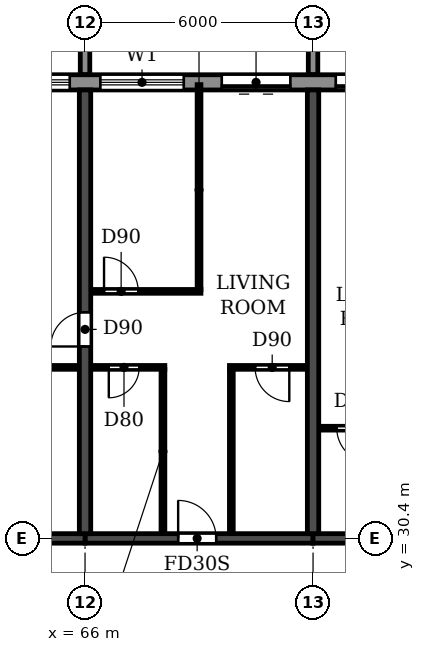
"""IFC4 building model, lengths in metres.
Left out: names, types, materials, properties, quantities, classifications, styles, units other than length and angle.
Written with IfcOpenShell. Run it as: python <this file> out.ifc"""

import sys

from ifc_helpers import new_model, si_unit, direction, frame, frame_2d, origin, place, context, subcontext, project, spatial, polyline, rectangle, outline, extrude, source, transform, mapped, element, fill, save


model = new_model("IFC4")
c1 = context("Model", 3, precision=1e-05, world=origin(), true_north=direction((0.0, 1.0)))
c2 = subcontext(c1, "Body", "Model", "MODEL_VIEW")
j1 = project(units=[si_unit("LENGTHUNIT", "METRE"), si_unit("PLANEANGLEUNIT", "RADIAN")], contexts=[c1])
p1 = place(None, origin())
s1 = spatial("IfcSite", under=j1, at=p1, CompositionType="ELEMENT")
p2 = place(p1, origin())
s2 = spatial("IfcBuilding", under=s1, at=p2, CompositionType="ELEMENT")
p3 = place(p2, frame((0.0, 0.0, 142.2)))
s3 = spatial("IfcBuildingStorey", under=s2, at=p3, CompositionType="ELEMENT", Elevation=142.2)
p4 = place(p3, frame((66.0, 30.525, 0.0), z_axis=(0.0, 0.0, 1.0), x_axis=(0.0, 1.0, 0.0)))
e1 = element("IfcWall", 1, at=p4, inside=s3, PredefinedType="SHEAR", context=c2, shape_type="SweptSolid", body=[
    extrude(rectangle(XDim=11.675, YDim=0.3, at=frame_2d((5.837, 0.0))), origin(), (0.0, 0.0, 1.0), 3.07),
])
p5 = place(p4, frame((4.925, 0.0, 0.0)))
e2 = element("IfcOpeningElement", 2, at=p5, cuts=e1, PredefinedType="OPENING", context=c2, shape_type="SweptSolid", body=[
    extrude(rectangle(XDim=0.9, YDim=2.1, at=frame_2d((0.45, 1.05))), frame((0.0, 0.16, 0.0), z_axis=(0.0, -1.0, 0.0), x_axis=(1.0, 0.0, 0.0)), (0.0, 0.0, 1.0), 0.32),
])
p6 = place(p3, frame((72.0, 30.525, 0.0), z_axis=(0.0, 0.0, 1.0), x_axis=(0.0, 1.0, 0.0)))
e3 = element("IfcWall", 3, at=p6, inside=s3, PredefinedType="SHEAR", context=c2, shape_type="SweptSolid", body=[
    extrude(rectangle(XDim=11.675, YDim=0.3, at=frame_2d((5.837, 0.0))), origin(), (0.0, 0.0, 1.0), 3.07),
])
p7 = place(p3, frame((60.0, 30.4, 0.0), z_axis=(0.0, 0.0, 1.0), x_axis=(1.0, 0.0, 0.0)))
e4 = element("IfcWall", 4, at=p7, inside=s3, PredefinedType="SHEAR", context=c2, shape_type="SweptSolid", body=[
    extrude(rectangle(XDim=6.0, YDim=0.25, at=frame_2d((3.0, 0.0))), origin(), (0.0, 0.0, 1.0), 2.47),
])
p8 = place(p3, frame((66.0, 30.4, 0.0), z_axis=(0.0, 0.0, 1.0), x_axis=(1.0, 0.0, 0.0)))
e5 = element("IfcWall", 5, at=p8, inside=s3, PredefinedType="SHEAR", context=c2, shape_type="SweptSolid", body=[
    extrude(rectangle(XDim=6.0, YDim=0.25, at=frame_2d((3.0, 0.0))), origin(), (0.0, 0.0, 1.0), 2.47),
])
p9 = place(p8, frame((2.45, 0.0, 0.0)))
e6 = element("IfcOpeningElement", 6, at=p9, cuts=e5, PredefinedType="OPENING", context=c2, shape_type="SweptSolid", body=[
    extrude(rectangle(XDim=1.0, YDim=2.1, at=frame_2d((0.5, 1.05))), frame((0.0, 0.135, 0.0), z_axis=(0.0, -1.0, 0.0), x_axis=(1.0, 0.0, 0.0)), (0.0, 0.0, 1.0), 0.27),
])
p10 = place(p3, frame((72.0, 30.4, 0.0), z_axis=(0.0, 0.0, 1.0), x_axis=(1.0, 0.0, 0.0)))
e7 = element("IfcWall", 7, at=p10, inside=s3, PredefinedType="SHEAR", context=c2, shape_type="SweptSolid", body=[
    extrude(rectangle(XDim=6.0, YDim=0.25, at=frame_2d((3.0, 0.0))), origin(), (0.0, 0.0, 1.0), 2.47),
])
p11 = place(p10, frame((2.55, 0.0, 0.0)))
e8 = element("IfcOpeningElement", 8, at=p11, cuts=e7, PredefinedType="OPENING", context=c2, shape_type="SweptSolid", body=[
    extrude(rectangle(XDim=1.0, YDim=2.1, at=frame_2d((0.5, 1.05))), frame((0.0, 0.135, 0.0), z_axis=(0.0, -1.0, 0.0), x_axis=(1.0, 0.0, 0.0)), (0.0, 0.0, 1.0), 0.27),
])
p12 = place(p3, frame((85.317, 42.4, 0.0), z_axis=(0.0, 0.0, 1.0), x_axis=(-1.0, 0.0, 0.0)))
e9 = element("IfcWall", 9, at=p12, inside=s3, PredefinedType="STANDARD", context=c2, shape_type="SweptSolid", body=[
    extrude(rectangle(XDim=68.634, YDim=0.4, at=frame_2d((34.317, 0.0))), origin(), (0.0, 0.0, 1.0), 3.07),
])
p13 = place(p12, frame((64.717, 0.0, 0.9)))
e10 = element("IfcOpeningElement", 10, at=p13, cuts=e9, PredefinedType="OPENING", context=c2, shape_type="SweptSolid", body=[
    extrude(rectangle(XDim=2.2, YDim=1.5, at=frame_2d((1.1, 0.75))), frame((0.0, 0.21, 0.0), z_axis=(0.0, -1.0, 0.0), x_axis=(1.0, 0.0, 0.0)), (0.0, 0.0, 1.0), 0.42),
])
p14 = place(p12, frame((61.917, 0.0, 0.0)))
e11 = element("IfcOpeningElement", 11, at=p14, cuts=e9, PredefinedType="OPENING", context=c2, shape_type="SweptSolid", body=[
    extrude(rectangle(XDim=1.8, YDim=2.4, at=frame_2d((0.9, 1.2))), frame((0.0, 0.21, 0.0), z_axis=(0.0, -1.0, 0.0), x_axis=(1.0, 0.0, 0.0)), (0.0, 0.0, 1.0), 0.42),
])
p15 = place(p12, frame((58.717, 0.0, 0.9)))
e12 = element("IfcOpeningElement", 12, at=p15, cuts=e9, PredefinedType="OPENING", context=c2, shape_type="SweptSolid", body=[
    extrude(rectangle(XDim=2.2, YDim=1.5, at=frame_2d((1.1, 0.75))), frame((0.0, 0.21, 0.0), z_axis=(0.0, -1.0, 0.0), x_axis=(1.0, 0.0, 0.0)), (0.0, 0.0, 1.0), 0.42),
])
p16 = place(p12, frame((55.917, 0.0, 0.0)))
e13 = element("IfcOpeningElement", 13, at=p16, cuts=e9, PredefinedType="OPENING", context=c2, shape_type="SweptSolid", body=[
    extrude(rectangle(XDim=1.8, YDim=2.4, at=frame_2d((0.9, 1.2))), frame((0.0, 0.21, 0.0), z_axis=(0.0, -1.0, 0.0), x_axis=(1.0, 0.0, 0.0)), (0.0, 0.0, 1.0), 0.42),
])
p17 = place(p12, frame((52.717, 0.0, 0.9)))
e14 = element("IfcOpeningElement", 14, at=p17, cuts=e9, PredefinedType="OPENING", context=c2, shape_type="SweptSolid", body=[
    extrude(rectangle(XDim=2.2, YDim=1.5, at=frame_2d((1.1, 0.75))), frame((0.0, 0.21, 0.0), z_axis=(0.0, -1.0, 0.0), x_axis=(1.0, 0.0, 0.0)), (0.0, 0.0, 1.0), 0.42),
])
p18 = place(p12, frame((49.717, 0.0, 0.9)))
e15 = element("IfcOpeningElement", 15, at=p18, cuts=e9, PredefinedType="OPENING", context=c2, shape_type="SweptSolid", body=[
    extrude(rectangle(XDim=2.2, YDim=1.5, at=frame_2d((1.1, 0.75))), frame((0.0, 0.21, 0.0), z_axis=(0.0, -1.0, 0.0), x_axis=(1.0, 0.0, 0.0)), (0.0, 0.0, 1.0), 0.42),
])
p19 = place(p12, frame((46.917, 0.0, 0.0)))
e16 = element("IfcOpeningElement", 16, at=p19, cuts=e9, PredefinedType="OPENING", context=c2, shape_type="SweptSolid", body=[
    extrude(rectangle(XDim=1.8, YDim=2.4, at=frame_2d((0.9, 1.2))), frame((0.0, 0.21, 0.0), z_axis=(0.0, -1.0, 0.0), x_axis=(1.0, 0.0, 0.0)), (0.0, 0.0, 1.0), 0.42),
])
p20 = place(p12, frame((43.717, 0.0, 0.9)))
e17 = element("IfcOpeningElement", 17, at=p20, cuts=e9, PredefinedType="OPENING", context=c2, shape_type="SweptSolid", body=[
    extrude(rectangle(XDim=2.2, YDim=1.5, at=frame_2d((1.1, 0.75))), frame((0.0, 0.21, 0.0), z_axis=(0.0, -1.0, 0.0), x_axis=(1.0, 0.0, 0.0)), (0.0, 0.0, 1.0), 0.42),
])
p21 = place(p12, frame((40.717, 0.0, 0.9)))
e18 = element("IfcOpeningElement", 18, at=p21, cuts=e9, PredefinedType="OPENING", context=c2, shape_type="SweptSolid", body=[
    extrude(rectangle(XDim=2.2, YDim=1.5, at=frame_2d((1.1, 0.75))), frame((0.0, 0.21, 0.0), z_axis=(0.0, -1.0, 0.0), x_axis=(1.0, 0.0, 0.0)), (0.0, 0.0, 1.0), 0.42),
])
p22 = place(p12, frame((37.717, 0.0, 0.9)))
e19 = element("IfcOpeningElement", 19, at=p22, cuts=e9, PredefinedType="OPENING", context=c2, shape_type="SweptSolid", body=[
    extrude(rectangle(XDim=2.2, YDim=1.5, at=frame_2d((1.1, 0.75))), frame((0.0, 0.21, 0.0), z_axis=(0.0, -1.0, 0.0), x_axis=(1.0, 0.0, 0.0)), (0.0, 0.0, 1.0), 0.42),
])
p23 = place(p12, frame((34.717, 0.0, 0.9)))
e20 = element("IfcOpeningElement", 20, at=p23, cuts=e9, PredefinedType="OPENING", context=c2, shape_type="SweptSolid", body=[
    extrude(rectangle(XDim=2.2, YDim=1.5, at=frame_2d((1.1, 0.75))), frame((0.0, 0.21, 0.0), z_axis=(0.0, -1.0, 0.0), x_axis=(1.0, 0.0, 0.0)), (0.0, 0.0, 1.0), 0.42),
])
p24 = place(p12, frame((31.917, 0.0, 0.0)))
e21 = element("IfcOpeningElement", 21, at=p24, cuts=e9, PredefinedType="OPENING", context=c2, shape_type="SweptSolid", body=[
    extrude(rectangle(XDim=1.8, YDim=2.4, at=frame_2d((0.9, 1.2))), frame((0.0, 0.21, 0.0), z_axis=(0.0, -1.0, 0.0), x_axis=(1.0, 0.0, 0.0)), (0.0, 0.0, 1.0), 0.42),
])
p25 = place(p12, frame((28.917, 0.0, 0.0)))
e22 = element("IfcOpeningElement", 22, at=p25, cuts=e9, PredefinedType="OPENING", context=c2, shape_type="SweptSolid", body=[
    extrude(rectangle(XDim=1.8, YDim=2.4, at=frame_2d((0.9, 1.2))), frame((0.0, 0.21, 0.0), z_axis=(0.0, -1.0, 0.0), x_axis=(1.0, 0.0, 0.0)), (0.0, 0.0, 1.0), 0.42),
])
p26 = place(p12, frame((25.717, 0.0, 0.9)))
e23 = element("IfcOpeningElement", 23, at=p26, cuts=e9, PredefinedType="OPENING", context=c2, shape_type="SweptSolid", body=[
    extrude(rectangle(XDim=2.2, YDim=1.5, at=frame_2d((1.1, 0.75))), frame((0.0, 0.21, 0.0), z_axis=(0.0, -1.0, 0.0), x_axis=(1.0, 0.0, 0.0)), (0.0, 0.0, 1.0), 0.42),
])
p27 = place(p12, frame((22.717, 0.0, 0.9)))
e24 = element("IfcOpeningElement", 24, at=p27, cuts=e9, PredefinedType="OPENING", context=c2, shape_type="SweptSolid", body=[
    extrude(rectangle(XDim=2.2, YDim=1.5, at=frame_2d((1.1, 0.75))), frame((0.0, 0.21, 0.0), z_axis=(0.0, -1.0, 0.0), x_axis=(1.0, 0.0, 0.0)), (0.0, 0.0, 1.0), 0.42),
])
p28 = place(p12, frame((19.717, 0.0, 0.9)))
e25 = element("IfcOpeningElement", 25, at=p28, cuts=e9, PredefinedType="OPENING", context=c2, shape_type="SweptSolid", body=[
    extrude(rectangle(XDim=2.2, YDim=1.5, at=frame_2d((1.1, 0.75))), frame((0.0, 0.21, 0.0), z_axis=(0.0, -1.0, 0.0), x_axis=(1.0, 0.0, 0.0)), (0.0, 0.0, 1.0), 0.42),
])
p29 = place(p12, frame((16.717, 0.0, 0.9)))
e26 = element("IfcOpeningElement", 26, at=p29, cuts=e9, PredefinedType="OPENING", context=c2, shape_type="SweptSolid", body=[
    extrude(rectangle(XDim=2.2, YDim=1.5, at=frame_2d((1.1, 0.75))), frame((0.0, 0.21, 0.0), z_axis=(0.0, -1.0, 0.0), x_axis=(1.0, 0.0, 0.0)), (0.0, 0.0, 1.0), 0.42),
])
p30 = place(p12, frame((13.917, 0.0, 0.0)))
e27 = element("IfcOpeningElement", 27, at=p30, cuts=e9, PredefinedType="OPENING", context=c2, shape_type="SweptSolid", body=[
    extrude(rectangle(XDim=1.8, YDim=2.4, at=frame_2d((0.9, 1.2))), frame((0.0, 0.21, 0.0), z_axis=(0.0, -1.0, 0.0), x_axis=(1.0, 0.0, 0.0)), (0.0, 0.0, 1.0), 0.42),
])
p31 = place(p12, frame((10.917, 0.0, 0.0)))
e28 = element("IfcOpeningElement", 28, at=p31, cuts=e9, PredefinedType="OPENING", context=c2, shape_type="SweptSolid", body=[
    extrude(rectangle(XDim=1.8, YDim=2.4, at=frame_2d((0.9, 1.2))), frame((0.0, 0.21, 0.0), z_axis=(0.0, -1.0, 0.0), x_axis=(1.0, 0.0, 0.0)), (0.0, 0.0, 1.0), 0.42),
])
p32 = place(p12, frame((7.717, 0.0, 0.9)))
e29 = element("IfcOpeningElement", 29, at=p32, cuts=e9, PredefinedType="OPENING", context=c2, shape_type="SweptSolid", body=[
    extrude(rectangle(XDim=2.2, YDim=1.5, at=frame_2d((1.1, 0.75))), frame((0.0, 0.21, 0.0), z_axis=(0.0, -1.0, 0.0), x_axis=(1.0, 0.0, 0.0)), (0.0, 0.0, 1.0), 0.42),
])
p33 = place(p12, frame((4.717, 0.0, 0.9)))
e30 = element("IfcOpeningElement", 30, at=p33, cuts=e9, PredefinedType="OPENING", context=c2, shape_type="SweptSolid", body=[
    extrude(rectangle(XDim=2.2, YDim=1.5, at=frame_2d((1.1, 0.75))), frame((0.0, 0.21, 0.0), z_axis=(0.0, -1.0, 0.0), x_axis=(1.0, 0.0, 0.0)), (0.0, 0.0, 1.0), 0.42),
])
p34 = place(p12, frame((1.917, 0.0, 0.0)))
e31 = element("IfcOpeningElement", 31, at=p34, cuts=e9, PredefinedType="OPENING", context=c2, shape_type="SweptSolid", body=[
    extrude(rectangle(XDim=1.8, YDim=2.4, at=frame_2d((0.9, 1.2))), frame((0.0, 0.21, 0.0), z_axis=(0.0, -1.0, 0.0), x_axis=(1.0, 0.0, 0.0)), (0.0, 0.0, 1.0), 0.42),
])
m1 = source(origin(), c2, "Body", "SweptSolid", [
    extrude(outline(polyline([(0.0, 0.0), (0.25, 0.0), (0.25, 3.1), (0.0, 3.1), (0.0, 0.0)])), origin(), (0.0, 0.0, 1.0), 3.1),
])
for number, where in (
    (32, (65.875, 42.6, 0.0)),
    (33, (71.875, 42.6, 0.0)),
):
    element("IfcWall", number, at=place(p3, frame(where)), inside=s3, PredefinedType="STANDARD", context=c2, shape_type="MappedRepresentation", body=[
        mapped(m1, transform((0.0, 0.0, 0.0))),
    ])
p35 = place(p3, frame((72.16, 33.3, 0.0), z_axis=(0.0, 0.0, 1.0), x_axis=(1.0, 0.0, 0.0)))
e34 = element("IfcWall", 34, at=p35, inside=s3, PredefinedType="PARTITIONING", context=c2, shape_type="SweptSolid", body=[
    extrude(rectangle(XDim=2.04, YDim=0.1, at=frame_2d((1.02, 0.0))), origin(), (0.0, 0.0, 1.0), 3.07),
])
p36 = place(p35, frame((0.465, 0.0, 0.0)))
e35 = element("IfcOpeningElement", 35, at=p36, cuts=e34, PredefinedType="OPENING", context=c2, shape_type="SweptSolid", body=[
    extrude(rectangle(XDim=0.9, YDim=2.1, at=frame_2d((0.45, 1.05))), frame((0.0, 0.06, 0.0), z_axis=(0.0, -1.0, 0.0), x_axis=(1.0, 0.0, 0.0)), (0.0, 0.0, 1.0), 0.12),
])
p37 = place(p3, frame((63.1, 34.9, 0.0), z_axis=(0.0, 0.0, 1.0), x_axis=(1.0, 0.0, 0.0)))
e36 = element("IfcWall", 36, at=p37, inside=s3, PredefinedType="PARTITIONING", context=c2, shape_type="SweptSolid", body=[
    extrude(rectangle(XDim=2.74, YDim=0.1, at=frame_2d((1.37, 0.0))), origin(), (0.0, 0.0, 1.0), 3.07),
])
p38 = place(p37, frame((1.0, 0.0, 0.0)))
e37 = element("IfcOpeningElement", 37, at=p38, cuts=e36, PredefinedType="OPENING", context=c2, shape_type="SweptSolid", body=[
    extrude(rectangle(XDim=0.8, YDim=2.1, at=frame_2d((0.4, 1.05))), frame((0.0, 0.06, 0.0), z_axis=(0.0, -1.0, 0.0), x_axis=(1.0, 0.0, 0.0)), (0.0, 0.0, 1.0), 0.12),
])
p39 = place(p3, frame((66.16, 34.9, 0.0), z_axis=(0.0, 0.0, 1.0), x_axis=(1.0, 0.0, 0.0)))
e38 = element("IfcWall", 38, at=p39, inside=s3, PredefinedType="PARTITIONING", context=c2, shape_type="SweptSolid", body=[
    extrude(rectangle(XDim=1.94, YDim=0.1, at=frame_2d((0.97, 0.0))), origin(), (0.0, 0.0, 1.0), 3.07),
])
p40 = place(p39, frame((0.465, 0.0, 0.0)))
e39 = element("IfcOpeningElement", 39, at=p40, cuts=e38, PredefinedType="OPENING", context=c2, shape_type="SweptSolid", body=[
    extrude(rectangle(XDim=0.8, YDim=2.1, at=frame_2d((0.4, 1.05))), frame((0.0, 0.06, 0.0), z_axis=(0.0, -1.0, 0.0), x_axis=(1.0, 0.0, 0.0)), (0.0, 0.0, 1.0), 0.12),
])
p41 = place(p3, frame((69.8, 34.9, 0.0), z_axis=(0.0, 0.0, 1.0), x_axis=(1.0, 0.0, 0.0)))
e40 = element("IfcWall", 40, at=p41, inside=s3, PredefinedType="PARTITIONING", context=c2, shape_type="SweptSolid", body=[
    extrude(rectangle(XDim=2.04, YDim=0.1, at=frame_2d((1.02, 0.0))), origin(), (0.0, 0.0, 1.0), 3.07),
])
p42 = place(p41, frame((0.675, 0.0, 0.0)))
e41 = element("IfcOpeningElement", 41, at=p42, cuts=e40, PredefinedType="OPENING", context=c2, shape_type="SweptSolid", body=[
    extrude(rectangle(XDim=0.9, YDim=2.1, at=frame_2d((0.45, 1.05))), frame((0.0, 0.06, 0.0), z_axis=(0.0, -1.0, 0.0), x_axis=(1.0, 0.0, 0.0)), (0.0, 0.0, 1.0), 0.12),
])
p43 = place(p3, frame((66.16, 36.9, 0.0), z_axis=(0.0, 0.0, 1.0), x_axis=(1.0, 0.0, 0.0)))
e42 = element("IfcWall", 42, at=p43, inside=s3, PredefinedType="PARTITIONING", context=c2, shape_type="SweptSolid", body=[
    extrude(rectangle(XDim=2.89, YDim=0.1, at=frame_2d((1.445, 0.0))), origin(), (0.0, 0.0, 1.0), 3.07),
])
p44 = place(p43, frame((0.34, 0.0, 0.0)))
e43 = element("IfcOpeningElement", 43, at=p44, cuts=e42, PredefinedType="OPENING", context=c2, shape_type="SweptSolid", body=[
    extrude(rectangle(XDim=0.9, YDim=2.1, at=frame_2d((0.45, 1.05))), frame((0.0, 0.06, 0.0), z_axis=(0.0, -1.0, 0.0), x_axis=(1.0, 0.0, 0.0)), (0.0, 0.0, 1.0), 0.12),
])
p45 = place(p3, frame((68.05, 30.535, 0.0), z_axis=(0.0, 0.0, 1.0), x_axis=(0.0, 1.0, 0.0)))
e44 = element("IfcWall", 44, at=p45, inside=s3, PredefinedType="PARTITIONING", context=c2, shape_type="SweptSolid", body=[
    extrude(rectangle(XDim=4.315, YDim=0.1, at=frame_2d((2.158, 0.0))), origin(), (0.0, 0.0, 1.0), 3.07),
])
p46 = place(p3, frame((69.0, 36.95, 0.0), z_axis=(0.0, 0.0, 1.0), x_axis=(0.0, 1.0, 0.0)))
e45 = element("IfcWall", 45, at=p46, inside=s3, PredefinedType="PARTITIONING", context=c2, shape_type="SweptSolid", body=[
    extrude(rectangle(XDim=5.39, YDim=0.1, at=frame_2d((2.695, 0.0))), origin(), (0.0, 0.0, 1.0), 3.07),
])
p47 = place(p3, frame((69.85, 30.535, 0.0), z_axis=(0.0, 0.0, 1.0), x_axis=(0.0, 1.0, 0.0)))
e46 = element("IfcWall", 46, at=p47, inside=s3, PredefinedType="PARTITIONING", context=c2, shape_type="SweptSolid", body=[
    extrude(rectangle(XDim=4.315, YDim=0.1, at=frame_2d((2.158, 0.0))), origin(), (0.0, 0.0, 1.0), 3.07),
])
p48 = place(p28, origin())
e47 = element("IfcWindow", 47, at=p48, inside=s3, PartitioningType="DOUBLE_PANEL_HORIZONTAL", PredefinedType="WINDOW", context=c2, shape_type="SweptSolid", body=[
    extrude(rectangle(XDim=2.2, YDim=1.5, at=frame_2d((1.1, 0.75))), frame((0.0, 0.03, 0.0), z_axis=(0.0, -1.0, 0.0), x_axis=(1.0, 0.0, 0.0)), (0.0, 0.0, 1.0), 0.06),
])
fill(e25, e47)
p49 = place(p29, origin())
e48 = element("IfcWindow", 48, at=p49, inside=s3, PartitioningType="DOUBLE_PANEL_HORIZONTAL", PredefinedType="WINDOW", context=c2, shape_type="SweptSolid", body=[
    extrude(rectangle(XDim=2.2, YDim=1.5, at=frame_2d((1.1, 0.75))), frame((0.0, 0.03, 0.0), z_axis=(0.0, -1.0, 0.0), x_axis=(1.0, 0.0, 0.0)), (0.0, 0.0, 1.0), 0.06),
])
fill(e26, e48)
p50 = place(p30, origin())
e49 = element("IfcDoor", 49, at=p50, inside=s3, OperationType="DOUBLE_DOOR_SLIDING", PredefinedType="DOOR", context=c2, shape_type="SweptSolid", body=[
    extrude(rectangle(XDim=1.8, YDim=2.4, at=frame_2d((0.9, 1.2))), frame((0.0, 0.025, 0.0), z_axis=(0.0, -1.0, 0.0), x_axis=(1.0, 0.0, 0.0)), (0.0, 0.0, 1.0), 0.05),
])
fill(e27, e49)
p51 = place(p31, origin())
e50 = element("IfcDoor", 50, at=p51, inside=s3, OperationType="DOUBLE_DOOR_SLIDING", PredefinedType="DOOR", context=c2, shape_type="SweptSolid", body=[
    extrude(rectangle(XDim=1.8, YDim=2.4, at=frame_2d((0.9, 1.2))), frame((0.0, 0.025, 0.0), z_axis=(0.0, -1.0, 0.0), x_axis=(1.0, 0.0, 0.0)), (0.0, 0.0, 1.0), 0.05),
])
fill(e28, e50)
p52 = place(p5, origin())
e51 = element("IfcDoor", 51, at=p52, inside=s3, OperationType="SINGLE_SWING_LEFT", PredefinedType="DOOR", context=c2, shape_type="SweptSolid", body=[
    extrude(rectangle(XDim=0.9, YDim=2.1, at=frame_2d((0.45, 1.05))), frame((0.0, 0.025, 0.0), z_axis=(0.0, -1.0, 0.0), x_axis=(1.0, 0.0, 0.0)), (0.0, 0.0, 1.0), 0.05),
])
fill(e2, e51)
p53 = place(p44, origin())
e52 = element("IfcDoor", 52, at=p53, inside=s3, OperationType="SINGLE_SWING_LEFT", PredefinedType="DOOR", context=c2, shape_type="SweptSolid", body=[
    extrude(rectangle(XDim=0.9, YDim=2.1, at=frame_2d((0.45, 1.05))), frame((0.0, 0.025, 0.0), z_axis=(0.0, -1.0, 0.0), x_axis=(1.0, 0.0, 0.0)), (0.0, 0.0, 1.0), 0.05),
])
fill(e43, e52)
p54 = place(p40, frame((0.8, 0.0, 0.0), z_axis=(0.0, 0.0, 1.0), x_axis=(-1.0, 0.0, 0.0)))
e53 = element("IfcDoor", 53, at=p54, inside=s3, OperationType="SINGLE_SWING_RIGHT", PredefinedType="DOOR", context=c2, shape_type="SweptSolid", body=[
    extrude(rectangle(XDim=0.8, YDim=2.1, at=frame_2d((0.4, 1.05))), frame((0.0, 0.025, 0.0), z_axis=(0.0, -1.0, 0.0), x_axis=(1.0, 0.0, 0.0)), (0.0, 0.0, 1.0), 0.05),
])
fill(e39, e53)
p55 = place(p9, origin())
e54 = element("IfcDoor", 54, at=p55, inside=s3, OperationType="SINGLE_SWING_LEFT", PredefinedType="DOOR", context=c2, shape_type="SweptSolid", body=[
    extrude(rectangle(XDim=1.0, YDim=2.1, at=frame_2d((0.5, 1.05))), frame((0.0, 0.025, 0.0), z_axis=(0.0, -1.0, 0.0), x_axis=(1.0, 0.0, 0.0)), (0.0, 0.0, 1.0), 0.05),
])
fill(e6, e54)
p56 = place(p42, frame((0.9, 0.0, 0.0), z_axis=(0.0, 0.0, 1.0), x_axis=(-1.0, 0.0, 0.0)))
e55 = element("IfcDoor", 55, at=p56, inside=s3, OperationType="SINGLE_SWING_LEFT", PredefinedType="DOOR", context=c2, shape_type="SweptSolid", body=[
    extrude(rectangle(XDim=0.9, YDim=2.1, at=frame_2d((0.45, 1.05))), frame((0.0, 0.025, 0.0), z_axis=(0.0, -1.0, 0.0), x_axis=(1.0, 0.0, 0.0)), (0.0, 0.0, 1.0), 0.05),
])
fill(e41, e55)
p57 = place(p36, frame((0.9, 0.0, 0.0), z_axis=(0.0, 0.0, 1.0), x_axis=(-1.0, 0.0, 0.0)))
e56 = element("IfcDoor", 56, at=p57, inside=s3, OperationType="SINGLE_SWING_LEFT", PredefinedType="DOOR", context=c2, shape_type="SweptSolid", body=[
    extrude(rectangle(XDim=0.9, YDim=2.1, at=frame_2d((0.45, 1.05))), frame((0.0, 0.025, 0.0), z_axis=(0.0, -1.0, 0.0), x_axis=(1.0, 0.0, 0.0)), (0.0, 0.0, 1.0), 0.05),
])
fill(e35, e56)
save(model, sys.argv[1])
